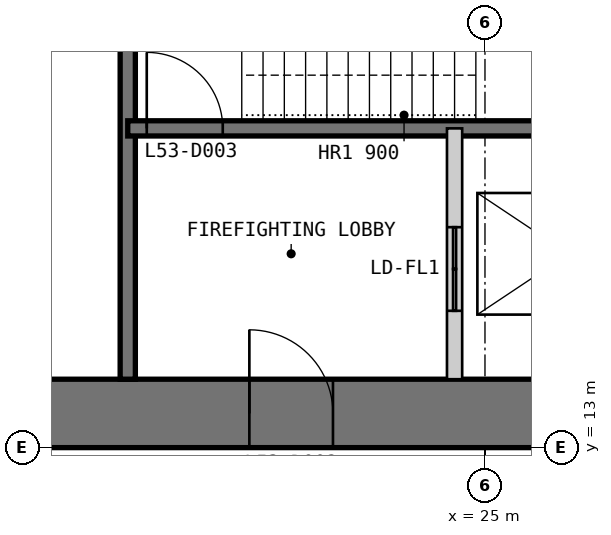
"""IFC4 building model, lengths in metres.
Left out: names, types, materials, properties, quantities, classifications, styles, units other than length and angle.
Written with IfcOpenShell. Run it as: python <this file> out.ifc"""

import sys

from ifc_helpers import new_model, si_unit, direction, frame, frame_2d, origin, place, context, subcontext, project, spatial, polyline, rectangle, outline, extrude, element, fill, save


model = new_model("IFC4")
c1 = context("Model", 3, precision=1e-05, world=origin(), true_north=direction((0.0, 1.0)))
c2 = subcontext(c1, "Body", "Model", "MODEL_VIEW")
j1 = project(units=[si_unit("LENGTHUNIT", "METRE"), si_unit("PLANEANGLEUNIT", "RADIAN")], contexts=[c1])
p1 = place(None, origin())
s1 = spatial("IfcSite", under=j1, at=p1, CompositionType="ELEMENT")
p2 = place(p1, origin())
s2 = spatial("IfcBuilding", under=s1, at=p2, CompositionType="ELEMENT")
p3 = place(p2, frame((0.0, 0.0, 225.8)))
s3 = spatial("IfcBuildingStorey", under=s2, at=p3, CompositionType="ELEMENT", Elevation=225.8)
p4 = place(p3, frame((13.0, 13.45, 0.0), z_axis=(0.0, 0.0, 1.0), x_axis=(1.0, 0.0, 0.0)))
e1 = element("IfcWall", 1, at=p4, inside=s3, PredefinedType="SHEAR", context=c2, shape_type="SweptSolid", body=[
    extrude(outline(polyline([(0.0, -0.45), (24.0, -0.45), (23.1, 0.45), (0.9, 0.45), (0.0, -0.45)])), origin(), (0.0, 0.0, 1.0), 4.0),
])
p5 = place(p4, frame((4.9, 0.0, 0.0)))
e2 = element("IfcOpeningElement", 2, at=p5, cuts=e1, PredefinedType="OPENING", context=c2, shape_type="SweptSolid", body=[
    extrude(rectangle(XDim=1.0, YDim=2.2, at=frame_2d((0.5, 1.1))), frame((0.0, 0.46, 0.0), z_axis=(0.0, -1.0, 0.0), x_axis=(1.0, 0.0, 0.0)), (0.0, 0.0, 1.0), 0.92),
])
p6 = place(p4, frame((8.9, 0.0, 0.0)))
e3 = element("IfcOpeningElement", 3, at=p6, cuts=e1, PredefinedType="OPENING", context=c2, shape_type="SweptSolid", body=[
    extrude(rectangle(XDim=1.1, YDim=2.2, at=frame_2d((0.55, 1.1))), frame((0.0, 0.46, 0.0), z_axis=(0.0, -1.0, 0.0), x_axis=(1.0, 0.0, 0.0)), (0.0, 0.0, 1.0), 0.92),
])
p7 = place(p4, frame((15.05, 0.0, 0.0)))
e4 = element("IfcOpeningElement", 4, at=p7, cuts=e1, PredefinedType="OPENING", context=c2, shape_type="SweptSolid", body=[
    extrude(rectangle(XDim=0.9, YDim=2.2, at=frame_2d((0.45, 1.1))), frame((0.0, 0.46, 0.0), z_axis=(0.0, -1.0, 0.0), x_axis=(1.0, 0.0, 0.0)), (0.0, 0.0, 1.0), 0.92),
])
p8 = place(p4, frame((17.9, 0.0, 0.0)))
e5 = element("IfcOpeningElement", 5, at=p8, cuts=e1, PredefinedType="OPENING", context=c2, shape_type="SweptSolid", body=[
    extrude(rectangle(XDim=1.0, YDim=2.2, at=frame_2d((0.5, 1.1))), frame((0.0, 0.46, 0.0), z_axis=(0.0, -1.0, 0.0), x_axis=(1.0, 0.0, 0.0)), (0.0, 0.0, 1.0), 0.92),
])
p9 = place(p4, frame((21.4, 0.0, 0.0)))
e6 = element("IfcOpeningElement", 6, at=p9, cuts=e1, PredefinedType="OPENING", context=c2, shape_type="SweptSolid", body=[
    extrude(rectangle(XDim=1.0, YDim=2.2, at=frame_2d((0.5, 1.1))), frame((0.0, 0.46, 0.0), z_axis=(0.0, -1.0, 0.0), x_axis=(1.0, 0.0, 0.0)), (0.0, 0.0, 1.0), 0.92),
])
p10 = place(p3, frame((20.3, 13.9, 0.0), z_axis=(0.0, 0.0, 1.0), x_axis=(0.0, 1.0, 0.0)))
e7 = element("IfcWall", 7, at=p10, inside=s3, PredefinedType="SOLIDWALL", context=c2, shape_type="SweptSolid", body=[
    extrude(rectangle(XDim=16.1, YDim=0.2, at=frame_2d((8.05, 0.0))), origin(), (0.0, 0.0, 1.0), 3.8),
])
p11 = place(p10, frame((6.65, 0.0, 0.0)))
e8 = element("IfcOpeningElement", 8, at=p11, cuts=e7, PredefinedType="OPENING", context=c2, shape_type="SweptSolid", body=[
    extrude(rectangle(XDim=0.9, YDim=2.2, at=frame_2d((0.45, 1.1))), frame((0.0, 0.11, 0.0), z_axis=(0.0, -1.0, 0.0), x_axis=(1.0, 0.0, 0.0)), (0.0, 0.0, 1.0), 0.22),
])
p12 = place(p10, frame((9.1, 0.0, 0.0)))
e9 = element("IfcOpeningElement", 9, at=p12, cuts=e7, PredefinedType="OPENING", context=c2, shape_type="SweptSolid", body=[
    extrude(rectangle(XDim=1.0, YDim=2.2, at=frame_2d((0.5, 1.1))), frame((0.0, 0.11, 0.0), z_axis=(0.0, -1.0, 0.0), x_axis=(1.0, 0.0, 0.0)), (0.0, 0.0, 1.0), 0.22),
])
p13 = place(p10, frame((13.15, 0.0, 0.0)))
e10 = element("IfcOpeningElement", 10, at=p13, cuts=e7, PredefinedType="OPENING", context=c2, shape_type="SweptSolid", body=[
    extrude(rectangle(XDim=0.9, YDim=2.2, at=frame_2d((0.45, 1.1))), frame((0.0, 0.11, 0.0), z_axis=(0.0, -1.0, 0.0), x_axis=(1.0, 0.0, 0.0)), (0.0, 0.0, 1.0), 0.22),
])
p14 = place(p3, frame((20.3, 17.2, 0.0), z_axis=(0.0, 0.0, 1.0), x_axis=(1.0, 0.0, 0.0)))
e11 = element("IfcWall", 11, at=p14, inside=s3, PredefinedType="SOLIDWALL", context=c2, shape_type="SweptSolid", body=[
    extrude(rectangle(XDim=9.4, YDim=0.2, at=frame_2d((4.7, 0.0))), origin(), (0.0, 0.0, 1.0), 3.8),
])
p15 = place(p14, frame((0.25, 0.0, 0.0)))
e12 = element("IfcOpeningElement", 12, at=p15, cuts=e11, PredefinedType="OPENING", context=c2, shape_type="SweptSolid", body=[
    extrude(rectangle(XDim=1.0, YDim=2.2, at=frame_2d((0.5, 1.1))), frame((0.0, 0.11, 0.0), z_axis=(0.0, -1.0, 0.0), x_axis=(1.0, 0.0, 0.0)), (0.0, 0.0, 1.0), 0.22),
])
p16 = place(p3, frame((24.6, 13.9, 0.0), z_axis=(0.0, 0.0, 1.0), x_axis=(0.0, 1.0, 0.0)))
e13 = element("IfcWall", 13, at=p16, inside=s3, PredefinedType="PARTITIONING", context=c2, shape_type="SweptSolid", body=[
    extrude(rectangle(XDim=3.3, YDim=0.2, at=frame_2d((1.65, 0.0))), origin(), (0.0, 0.0, 1.0), 3.8),
])
p17 = place(p16, frame((0.9, 0.0, 0.0)))
e14 = element("IfcOpeningElement", 14, at=p17, cuts=e13, PredefinedType="OPENING", context=c2, shape_type="SweptSolid", body=[
    extrude(rectangle(XDim=1.1, YDim=2.2, at=frame_2d((0.55, 1.1))), frame((0.0, 0.11, 0.0), z_axis=(0.0, -1.0, 0.0), x_axis=(1.0, 0.0, 0.0)), (0.0, 0.0, 1.0), 0.22),
])
p18 = place(p6, origin())
e15 = element("IfcDoor", 15, at=p18, inside=s3, OperationType="SINGLE_SWING_LEFT", PredefinedType="DOOR", context=c2, shape_type="SweptSolid", body=[
    extrude(rectangle(XDim=1.1, YDim=2.2, at=frame_2d((0.55, 1.1))), frame((0.0, 0.025, 0.0), z_axis=(0.0, -1.0, 0.0), x_axis=(1.0, 0.0, 0.0)), (0.0, 0.0, 1.0), 0.05),
    extrude(outline(polyline([(0.0, 0.0), (0.04, 0.0), (0.04, 2.16), (1.06, 2.16), (1.06, 0.0), (1.1, 0.0), (1.1, 2.2), (0.0, 2.2), (0.0, 0.0)])), frame((0.0, 0.3, 0.0), z_axis=(0.0, -1.0, 0.0), x_axis=(1.0, 0.0, 0.0)), (0.0, 0.0, 1.0), 0.6),
])
fill(e3, e15)
p19 = place(p15, origin())
e16 = element("IfcDoor", 16, at=p19, inside=s3, OperationType="SINGLE_SWING_LEFT", PredefinedType="DOOR", context=c2, shape_type="SweptSolid", body=[
    extrude(rectangle(XDim=1.0, YDim=2.2, at=frame_2d((0.5, 1.1))), frame((0.0, 0.025, 0.0), z_axis=(0.0, -1.0, 0.0), x_axis=(1.0, 0.0, 0.0)), (0.0, 0.0, 1.0), 0.05),
])
fill(e12, e16)
p20 = place(p17, origin())
e17 = element("IfcDoor", 17, at=p20, inside=s3, OperationType="DOUBLE_DOOR_SLIDING", PredefinedType="DOOR", context=c2, shape_type="SweptSolid", body=[
    extrude(rectangle(XDim=1.1, YDim=2.2, at=frame_2d((0.55, 1.1))), frame((0.0, 0.025, 0.0), z_axis=(0.0, -1.0, 0.0), x_axis=(1.0, 0.0, 0.0)), (0.0, 0.0, 1.0), 0.05),
])
fill(e14, e17)
save(model, sys.argv[1])
